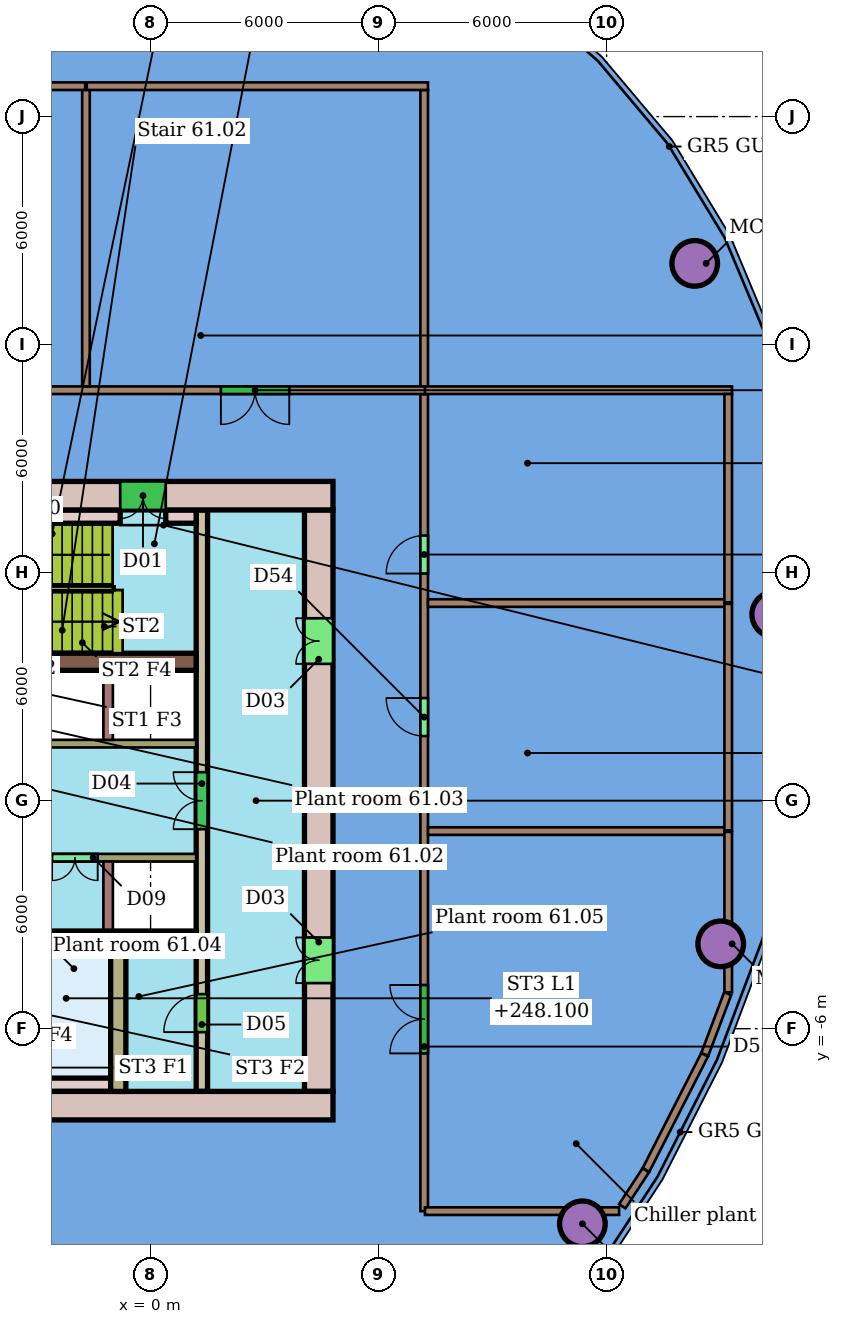
"""IFC4 building model, lengths in metres.
Left out: names, types, materials, properties, quantities, classifications, styles, units other than length and angle.
Written with IfcOpenShell. Run it as: python <this file> out.ifc"""

import sys

from ifc_helpers import new_model, si_unit, direction, frame, frame_2d, origin, origin_2d, place, context, subcontext, project, spatial, rectangle, hollow_circle, extrude, element, fill, save


model = new_model("IFC4")
c1 = context("Model", 3, precision=1e-05, world=origin(), true_north=direction((0.0, 1.0)))
c2 = subcontext(c1, "Body", "Model", "MODEL_VIEW")
j1 = project(units=[si_unit("LENGTHUNIT", "METRE"), si_unit("PLANEANGLEUNIT", "RADIAN")], contexts=[c1])
p1 = place(None, origin())
s1 = spatial("IfcSite", under=j1, at=p1, CompositionType="ELEMENT")
p2 = place(p1, origin())
s2 = spatial("IfcBuilding", under=s1, at=p2, CompositionType="ELEMENT")
p3 = place(p2, frame((0.0, 0.0, 246.1)))
s3 = spatial("IfcBuildingStorey", under=s2, at=p3, CompositionType="ELEMENT", Elevation=246.1)
for number, where, z_axis, x_axis in (
    (1, (11.363, -11.134, 0.0), (0.0, 0.0, 1.0), (1.0, 0.0, 0.0)),
    (2, (15.003, -3.768, 0.0), (0.0, 0.0, 1.0), (1.0, 0.0, 0.0)),
    (3, (16.424, 4.901, 0.0), (0.0, 0.0, 1.0), (1.0, 0.0, 0.0)),
    (4, (14.318, 14.137, 0.0), (0.0, 0.0, 1.0), (1.0, 0.0, 0.0)),
):
    element("IfcColumn", number, at=place(p3, frame(where, z_axis=z_axis, x_axis=x_axis)), inside=s3, PredefinedType="COLUMN", context=c2, shape_type="SweptSolid", body=[
        extrude(hollow_circle(Radius=0.6, WallThickness=0.045, at=origin_2d()), origin(), (0.0, 0.0, 1.0), 7.85),
    ])
p4 = place(p3, frame((7.2, -10.8, 0.0), z_axis=(0.0, 0.0, 1.0), x_axis=(0.0, 1.0, 0.0)))
e5 = element("IfcWall", 5, at=p4, inside=s3, PredefinedType="PARTITIONING", context=c2, shape_type="SweptSolid", body=[
    extrude(rectangle(XDim=21.5, YDim=0.2, at=frame_2d((10.75, 0.0))), origin(), (0.0, 0.0, 1.0), 7.5),
])
p5 = place(p4, frame((4.15, 0.0, 0.0)))
e6 = element("IfcOpeningElement", 6, at=p5, cuts=e5, PredefinedType="OPENING", context=c2, shape_type="SweptSolid", body=[
    extrude(rectangle(XDim=1.8, YDim=2.4, at=frame_2d((0.9, 1.2))), frame((0.0, 0.11, 0.0), z_axis=(0.0, -1.0, 0.0), x_axis=(1.0, 0.0, 0.0)), (0.0, 0.0, 1.0), 0.22),
])
p6 = place(p4, frame((12.5, 0.0, 0.0)))
e7 = element("IfcOpeningElement", 7, at=p6, cuts=e5, PredefinedType="OPENING", context=c2, shape_type="SweptSolid", body=[
    extrude(rectangle(XDim=1.0, YDim=2.1, at=frame_2d((0.5, 1.05))), frame((0.0, 0.11, 0.0), z_axis=(0.0, -1.0, 0.0), x_axis=(1.0, 0.0, 0.0)), (0.0, 0.0, 1.0), 0.22),
])
p7 = place(p4, frame((16.776, 0.0, 0.0)))
e8 = element("IfcOpeningElement", 8, at=p7, cuts=e5, PredefinedType="OPENING", context=c2, shape_type="SweptSolid", body=[
    extrude(rectangle(XDim=1.0, YDim=2.1, at=frame_2d((0.5, 1.05))), frame((0.0, 0.11, 0.0), z_axis=(0.0, -1.0, 0.0), x_axis=(1.0, 0.0, 0.0)), (0.0, 0.0, 1.0), 0.22),
])
p8 = place(p3, frame((7.2, 10.82, 0.0), z_axis=(0.0, 0.0, 1.0), x_axis=(0.0, 1.0, 0.0)))
e9 = element("IfcWall", 9, at=p8, inside=s3, PredefinedType="PARTITIONING", context=c2, shape_type="SweptSolid", body=[
    extrude(rectangle(XDim=7.88, YDim=0.2, at=frame_2d((3.94, 0.0))), origin(), (0.0, 0.0, 1.0), 7.5),
])
p9 = place(p3, frame((7.3, 10.8, 0.0), z_axis=(0.0, 0.0, 1.0), x_axis=(-1.0, 0.0, 0.0)))
e10 = element("IfcWall", 10, at=p9, inside=s3, PredefinedType="PARTITIONING", context=c2, shape_type="SweptSolid", body=[
    extrude(rectangle(XDim=26.6, YDim=0.2, at=frame_2d((13.3, 0.0))), origin(), (0.0, 0.0, 1.0), 7.5),
])
p10 = place(p9, frame((23.414, 0.0, 0.0)))
e11 = element("IfcOpeningElement", 11, at=p10, cuts=e10, PredefinedType="OPENING", context=c2, shape_type="SweptSolid", body=[
    extrude(rectangle(XDim=1.8, YDim=2.4, at=frame_2d((0.9, 1.2))), frame((0.0, 0.11, 0.0), z_axis=(0.0, -1.0, 0.0), x_axis=(1.0, 0.0, 0.0)), (0.0, 0.0, 1.0), 0.22),
])
p11 = place(p9, frame((12.35, 0.0, 0.0)))
e12 = element("IfcOpeningElement", 12, at=p11, cuts=e10, PredefinedType="OPENING", context=c2, shape_type="SweptSolid", body=[
    extrude(rectangle(XDim=1.8, YDim=2.4, at=frame_2d((0.9, 1.2))), frame((0.0, 0.11, 0.0), z_axis=(0.0, -1.0, 0.0), x_axis=(1.0, 0.0, 0.0)), (0.0, 0.0, 1.0), 0.22),
])
p12 = place(p9, frame((3.65, 0.0, 0.0)))
e13 = element("IfcOpeningElement", 13, at=p12, cuts=e10, PredefinedType="OPENING", context=c2, shape_type="SweptSolid", body=[
    extrude(rectangle(XDim=1.8, YDim=2.4, at=frame_2d((0.9, 1.2))), frame((0.0, 0.11, 0.0), z_axis=(0.0, -1.0, 0.0), x_axis=(1.0, 0.0, 0.0)), (0.0, 0.0, 1.0), 0.22),
])
p13 = place(p3, frame((7.22, 10.8, 0.0), z_axis=(0.0, 0.0, 1.0), x_axis=(1.0, 0.0, 0.0)))
e14 = element("IfcWall", 14, at=p13, inside=s3, PredefinedType="PARTITIONING", context=c2, shape_type="SweptSolid", body=[
    extrude(rectangle(XDim=8.08, YDim=0.2, at=frame_2d((4.04, 0.0))), origin(), (0.0, 0.0, 1.0), 7.5),
])
for number, where, z_axis, x_axis in (
    (15, (7.3, -0.8, 0.0), (0.0, 0.0, 1.0), (1.0, 0.0, 0.0)),
    (16, (7.3, 5.2, 0.0), (0.0, 0.0, 1.0), (1.0, 0.0, 0.0)),
):
    element("IfcWall", number, at=place(p3, frame(where, z_axis=z_axis, x_axis=x_axis)), inside=s3, PredefinedType="PARTITIONING", context=c2, shape_type="SweptSolid", body=[
        extrude(rectangle(XDim=7.9, YDim=0.2, at=frame_2d((3.95, 0.0))), origin(), (0.0, 0.0, 1.0), 7.5),
    ])
p14 = place(p3, frame((-1.7, 10.9, 0.0), z_axis=(0.0, 0.0, 1.0), x_axis=(0.0, 1.0, 0.0)))
e17 = element("IfcWall", 17, at=p14, inside=s3, PredefinedType="PARTITIONING", context=c2, shape_type="SweptSolid", body=[
    extrude(rectangle(XDim=7.9, YDim=0.2, at=frame_2d((3.95, 0.0))), origin(), (0.0, 0.0, 1.0), 7.5),
])
p15 = place(p3, frame((15.2, -5.042, 0.0), z_axis=(0.0, 0.0, 1.0), x_axis=(0.0, 1.0, 0.0)))
e18 = element("IfcWall", 18, at=p15, inside=s3, PredefinedType="PARTITIONING", context=c2, shape_type="SweptSolid", body=[
    extrude(rectangle(XDim=4.222, YDim=0.2, at=frame_2d((2.111, 0.0))), origin(), (0.0, 0.0, 1.0), 7.5),
])
p16 = place(p3, frame((15.2, -0.78, 0.0), z_axis=(0.0, 0.0, 1.0), x_axis=(0.0, 1.0, 0.0)))
e19 = element("IfcWall", 19, at=p16, inside=s3, PredefinedType="PARTITIONING", context=c2, shape_type="SweptSolid", body=[
    extrude(rectangle(XDim=5.96, YDim=0.2, at=frame_2d((2.98, 0.0))), origin(), (0.0, 0.0, 1.0), 7.5),
])
p17 = place(p3, frame((15.2, 5.22, 0.0), z_axis=(0.0, 0.0, 1.0), x_axis=(0.0, 1.0, 0.0)))
e20 = element("IfcWall", 20, at=p17, inside=s3, PredefinedType="PARTITIONING", context=c2, shape_type="SweptSolid", body=[
    extrude(rectangle(XDim=5.48, YDim=0.2, at=frame_2d((2.74, 0.0))), origin(), (0.0, 0.0, 1.0), 7.5),
])
p18 = place(p3, frame((14.583, -6.677, 0.0), z_axis=(0.0, 0.0, 1.0), x_axis=(0.353439463302, 0.935457399233, 0.0)))
e21 = element("IfcWall", 21, at=p18, inside=s3, PredefinedType="PARTITIONING", context=c2, shape_type="SweptSolid", body=[
    extrude(rectangle(XDim=1.709, YDim=0.2, at=frame_2d((0.854, 0.0))), origin(), (0.0, 0.0, 1.0), 7.5),
])
p19 = place(p3, frame((13.036, -9.718, 0.0), z_axis=(0.0, 0.0, 1.0), x_axis=(0.453691333143, 0.89115889393, 0.0)))
e22 = element("IfcWall", 22, at=p19, inside=s3, PredefinedType="PARTITIONING", context=c2, shape_type="SweptSolid", body=[
    extrude(rectangle(XDim=3.401, YDim=0.2, at=frame_2d((1.7, 0.0))), origin(), (0.0, 0.0, 1.0), 7.5),
])
p20 = place(p3, frame((12.412, -10.672, 0.0), z_axis=(0.0, 0.0, 1.0), x_axis=(0.546993030609, 0.837137159888, 0.0)))
e23 = element("IfcWall", 23, at=p20, inside=s3, PredefinedType="PARTITIONING", context=c2, shape_type="SweptSolid", body=[
    extrude(rectangle(XDim=1.129, YDim=0.2, at=frame_2d((0.564, 0.0))), origin(), (0.0, 0.0, 1.0), 7.5),
])
p21 = place(p3, frame((7.22, -10.8, 0.0), z_axis=(0.0, 0.0, 1.0), x_axis=(1.0, 0.0, 0.0)))
e24 = element("IfcWall", 24, at=p21, inside=s3, PredefinedType="PARTITIONING", context=c2, shape_type="SweptSolid", body=[
    extrude(rectangle(XDim=5.108, YDim=0.2, at=frame_2d((2.554, 0.0))), origin(), (0.0, 0.0, 1.0), 7.5),
])
p22 = place(p3, frame((-10.18, 18.8, 0.0), z_axis=(0.0, 0.0, 1.0), x_axis=(1.0, 0.0, 0.0)))
e25 = element("IfcWall", 25, at=p22, inside=s3, PredefinedType="PARTITIONING", context=c2, shape_type="SweptSolid", body=[
    extrude(rectangle(XDim=8.46, YDim=0.2, at=frame_2d((4.23, 0.0))), origin(), (0.0, 0.0, 1.0), 7.5),
])
p23 = place(p3, frame((-1.68, 18.8, 0.0), z_axis=(0.0, 0.0, 1.0), x_axis=(1.0, 0.0, 0.0)))
e26 = element("IfcWall", 26, at=p23, inside=s3, PredefinedType="PARTITIONING", context=c2, shape_type="SweptSolid", body=[
    extrude(rectangle(XDim=8.98, YDim=0.2, at=frame_2d((4.49, 0.0))), origin(), (0.0, 0.0, 1.0), 7.5),
])
p24 = place(p3, frame((4.8, 8.025, 0.0), z_axis=(0.0, 0.0, 1.0), x_axis=(-1.0, 0.0, 0.0)))
e27 = element("IfcWall", 27, at=p24, inside=s3, PredefinedType="SHEAR", context=c2, shape_type="SweptSolid", body=[
    extrude(rectangle(XDim=10.8, YDim=0.75, at=frame_2d((5.4, 0.0))), origin(), (0.0, 0.0, 1.0), 7.55),
])
p25 = place(p24, frame((4.4, 0.0, 0.0)))
e28 = element("IfcOpeningElement", 28, at=p25, cuts=e27, PredefinedType="OPENING", context=c2, shape_type="SweptSolid", body=[
    extrude(rectangle(XDim=1.2, YDim=2.1, at=frame_2d((0.6, 1.05))), frame((0.0, 0.385, 0.0), z_axis=(0.0, -1.0, 0.0), x_axis=(1.0, 0.0, 0.0)), (0.0, 0.0, 1.0), 0.77),
])
p26 = place(p3, frame((-16.8, -8.025, 0.0), z_axis=(0.0, 0.0, 1.0), x_axis=(1.0, 0.0, 0.0)))
e29 = element("IfcWall", 29, at=p26, inside=s3, PredefinedType="SHEAR", context=c2, shape_type="SweptSolid", body=[
    extrude(rectangle(XDim=21.6, YDim=0.75, at=frame_2d((10.8, 0.0))), origin(), (0.0, 0.0, 1.0), 7.55),
])
p27 = place(p26, frame((4.8, 0.0, 0.0)))
e30 = element("IfcOpeningElement", 30, at=p27, cuts=e29, PredefinedType="OPENING", context=c2, shape_type="SweptSolid", body=[
    extrude(rectangle(XDim=1.2, YDim=2.1, at=frame_2d((0.6, 1.05))), frame((0.0, 0.385, 0.0), z_axis=(0.0, -1.0, 0.0), x_axis=(1.0, 0.0, 0.0)), (0.0, 0.0, 1.0), 0.77),
])
p28 = place(p3, frame((4.425, -7.65, 0.0), z_axis=(0.0, 0.0, 1.0), x_axis=(0.0, 1.0, 0.0)))
e31 = element("IfcWall", 31, at=p28, inside=s3, PredefinedType="SHEAR", context=c2, shape_type="SweptSolid", body=[
    extrude(rectangle(XDim=15.3, YDim=0.75, at=frame_2d((7.65, 0.0))), origin(), (0.0, 0.0, 1.0), 7.55),
])
p29 = place(p28, frame((2.85, 0.0, 0.0)))
e32 = element("IfcOpeningElement", 32, at=p29, cuts=e31, PredefinedType="OPENING", context=c2, shape_type="SweptSolid", body=[
    extrude(rectangle(XDim=1.2, YDim=2.1, at=frame_2d((0.6, 1.05))), frame((0.0, 0.385, 0.0), z_axis=(0.0, -1.0, 0.0), x_axis=(1.0, 0.0, 0.0)), (0.0, 0.0, 1.0), 0.77),
])
p30 = place(p28, frame((11.25, 0.0, 0.0)))
e33 = element("IfcOpeningElement", 33, at=p30, cuts=e31, PredefinedType="OPENING", context=c2, shape_type="SweptSolid", body=[
    extrude(rectangle(XDim=1.2, YDim=2.1, at=frame_2d((0.6, 1.05))), frame((0.0, 0.385, 0.0), z_axis=(0.0, -1.0, 0.0), x_axis=(1.0, 0.0, 0.0)), (0.0, 0.0, 1.0), 0.77),
])
for number, where, z_axis, x_axis in (
    (34, (-6.0, 3.655, 0.0), (0.0, 0.0, 1.0), (1.0, 0.0, 0.0)),
    (35, (-6.0, -3.655, 0.0), (0.0, 0.0, 1.0), (1.0, 0.0, 0.0)),
):
    element("IfcWall", number, at=place(p3, frame(where, z_axis=z_axis, x_axis=x_axis)), inside=s3, PredefinedType="SHEAR", context=c2, shape_type="SweptSolid", body=[
        extrude(rectangle(XDim=7.2, YDim=0.45, at=frame_2d((3.6, 0.0))), origin(), (0.0, 0.0, 1.0), 7.55),
    ])
p31 = place(p3, frame((1.35, -7.65, 0.0), z_axis=(0.0, 0.0, 1.0), x_axis=(0.0, 1.0, 0.0)))
e36 = element("IfcWall", 36, at=p31, inside=s3, PredefinedType="SHEAR", context=c2, shape_type="SweptSolid", body=[
    extrude(rectangle(XDim=15.3, YDim=0.3, at=frame_2d((7.65, 0.0))), origin(), (0.0, 0.0, 1.0), 7.55),
])
p32 = place(p31, frame((1.56, 0.0, 0.0)))
e37 = element("IfcOpeningElement", 37, at=p32, cuts=e36, PredefinedType="OPENING", context=c2, shape_type="SweptSolid", body=[
    extrude(rectangle(XDim=1.0, YDim=2.1, at=frame_2d((0.5, 1.05))), frame((0.0, 0.16, 0.0), z_axis=(0.0, -1.0, 0.0), x_axis=(1.0, 0.0, 0.0)), (0.0, 0.0, 1.0), 0.32),
])
p33 = place(p31, frame((6.9, 0.0, 0.0)))
e38 = element("IfcOpeningElement", 38, at=p33, cuts=e36, PredefinedType="OPENING", context=c2, shape_type="SweptSolid", body=[
    extrude(rectangle(XDim=1.5, YDim=2.1, at=frame_2d((0.75, 1.05))), frame((0.0, 0.16, 0.0), z_axis=(0.0, -1.0, 0.0), x_axis=(1.0, 0.0, 0.0)), (0.0, 0.0, 1.0), 0.32),
])
p34 = place(p3, frame((-13.2, 1.5, 0.0), z_axis=(0.0, 0.0, 1.0), x_axis=(1.0, 0.0, 0.0)))
e39 = element("IfcWall", 39, at=p34, inside=s3, PredefinedType="SHEAR", context=c2, shape_type="SweptSolid", body=[
    extrude(rectangle(XDim=14.4, YDim=0.2, at=frame_2d((7.2, 0.0))), origin(), (0.0, 0.0, 1.0), 7.55),
])
p35 = place(p34, frame((0.15, 0.0, 0.0)))
e40 = element("IfcOpeningElement", 40, at=p35, cuts=e39, PredefinedType="OPENING", context=c2, shape_type="SweptSolid", body=[
    extrude(rectangle(XDim=1.2, YDim=2.4, at=frame_2d((0.6, 1.2))), frame((0.0, 0.11, 0.0), z_axis=(0.0, -1.0, 0.0), x_axis=(1.0, 0.0, 0.0)), (0.0, 0.0, 1.0), 0.22),
])
p36 = place(p34, frame((2.794, 0.0, 0.0)))
e41 = element("IfcOpeningElement", 41, at=p36, cuts=e39, PredefinedType="OPENING", context=c2, shape_type="SweptSolid", body=[
    extrude(rectangle(XDim=1.2, YDim=2.4, at=frame_2d((0.6, 1.2))), frame((0.0, 0.11, 0.0), z_axis=(0.0, -1.0, 0.0), x_axis=(1.0, 0.0, 0.0)), (0.0, 0.0, 1.0), 0.22),
])
p37 = place(p34, frame((8.167, 0.0, 0.0)))
e42 = element("IfcOpeningElement", 42, at=p37, cuts=e39, PredefinedType="OPENING", context=c2, shape_type="SweptSolid", body=[
    extrude(rectangle(XDim=1.2, YDim=2.4, at=frame_2d((0.6, 1.2))), frame((0.0, 0.11, 0.0), z_axis=(0.0, -1.0, 0.0), x_axis=(1.0, 0.0, 0.0)), (0.0, 0.0, 1.0), 0.22),
])
p38 = place(p3, frame((1.2, -1.5, 0.0), z_axis=(0.0, 0.0, 1.0), x_axis=(-1.0, 0.0, 0.0)))
e43 = element("IfcWall", 43, at=p38, inside=s3, PredefinedType="SHEAR", context=c2, shape_type="SweptSolid", body=[
    extrude(rectangle(XDim=14.4, YDim=0.2, at=frame_2d((7.2, 0.0))), origin(), (0.0, 0.0, 1.0), 7.55),
])
p39 = place(p38, frame((7.821, 0.0, 0.0)))
e44 = element("IfcOpeningElement", 44, at=p39, cuts=e43, PredefinedType="OPENING", context=c2, shape_type="SweptSolid", body=[
    extrude(rectangle(XDim=1.2, YDim=2.1, at=frame_2d((0.6, 1.05))), frame((0.0, 0.11, 0.0), z_axis=(0.0, -1.0, 0.0), x_axis=(1.0, 0.0, 0.0)), (0.0, 0.0, 1.0), 0.22),
])
p40 = place(p38, frame((2.592, 0.0, 0.0)))
e45 = element("IfcOpeningElement", 45, at=p40, cuts=e43, PredefinedType="OPENING", context=c2, shape_type="SweptSolid", body=[
    extrude(rectangle(XDim=1.2, YDim=2.4, at=frame_2d((0.6, 1.2))), frame((0.0, 0.11, 0.0), z_axis=(0.0, -1.0, 0.0), x_axis=(1.0, 0.0, 0.0)), (0.0, 0.0, 1.0), 0.22),
])
p41 = place(p3, frame((-0.85, -3.88, 0.0), z_axis=(0.0, 0.0, 1.0), x_axis=(0.0, -1.0, 0.0)))
e46 = element("IfcWall", 46, at=p41, inside=s3, PredefinedType="SHEAR", context=c2, shape_type="SweptSolid", body=[
    extrude(rectangle(XDim=3.77, YDim=0.4, at=frame_2d((1.885, 0.0))), origin(), (0.0, 0.0, 1.0), 7.55),
])
p42 = place(p3, frame((-5.85, 7.475, 0.0), z_axis=(0.0, 0.0, 1.0), x_axis=(1.0, 0.0, 0.0)))
e47 = element("IfcWall", 47, at=p42, inside=s3, PredefinedType="SHEAR", context=c2, shape_type="SweptSolid", body=[
    extrude(rectangle(XDim=5.05, YDim=0.35, at=frame_2d((2.525, 0.0))), origin(), (0.0, 0.0, 1.0), 7.55),
])
p43 = place(p3, frame((0.4, 7.475, 0.0), z_axis=(0.0, 0.0, 1.0), x_axis=(1.0, 0.0, 0.0)))
e48 = element("IfcWall", 48, at=p43, inside=s3, PredefinedType="SHEAR", context=c2, shape_type="SweptSolid", body=[
    extrude(rectangle(XDim=0.8, YDim=0.35, at=frame_2d((0.4, 0.0))), origin(), (0.0, 0.0, 1.0), 7.55),
])
p44 = place(p3, frame((-8.1, -7.475, 0.0), z_axis=(0.0, 0.0, 1.0), x_axis=(1.0, 0.0, 0.0)))
e49 = element("IfcWall", 49, at=p44, inside=s3, PredefinedType="SHEAR", context=c2, shape_type="SweptSolid", body=[
    extrude(rectangle(XDim=7.05, YDim=0.35, at=frame_2d((3.525, 0.0))), origin(), (0.0, 0.0, 1.0), 7.55),
])
for number, where, z_axis, x_axis in (
    (50, (-1.117, 1.6, 0.0), (0.0, 0.0, 1.0), (0.0, 1.0, 0.0)),
    (51, (-1.117, -1.6, 0.0), (0.0, 0.0, 1.0), (0.0, -1.0, 0.0)),
):
    element("IfcWall", number, at=place(p3, frame(where, z_axis=z_axis, x_axis=x_axis)), inside=s3, PredefinedType="SHEAR", context=c2, shape_type="SweptSolid", body=[
        extrude(rectangle(XDim=1.83, YDim=0.25, at=frame_2d((0.915, 0.0))), origin(), (0.0, 0.0, 1.0), 7.55),
    ])
p45 = place(p5, origin())
e52 = element("IfcDoor", 52, at=p45, inside=s3, OperationType="DOUBLE_DOOR_SINGLE_SWING", PredefinedType="DOOR", context=c2, shape_type="SweptSolid", body=[
    extrude(rectangle(XDim=1.8, YDim=2.4, at=frame_2d((0.9, 1.2))), frame((0.0, 0.025, 0.0), z_axis=(0.0, -1.0, 0.0), x_axis=(1.0, 0.0, 0.0)), (0.0, 0.0, 1.0), 0.05),
])
fill(e6, e52)
p46 = place(p6, origin())
e53 = element("IfcDoor", 53, at=p46, inside=s3, OperationType="SINGLE_SWING_RIGHT", PredefinedType="DOOR", context=c2, shape_type="SweptSolid", body=[
    extrude(rectangle(XDim=1.0, YDim=2.1, at=frame_2d((0.5, 1.05))), frame((0.0, 0.025, 0.0), z_axis=(0.0, -1.0, 0.0), x_axis=(1.0, 0.0, 0.0)), (0.0, 0.0, 1.0), 0.05),
])
fill(e7, e53)
p47 = place(p7, origin())
e54 = element("IfcDoor", 54, at=p47, inside=s3, OperationType="SINGLE_SWING_LEFT", PredefinedType="DOOR", context=c2, shape_type="SweptSolid", body=[
    extrude(rectangle(XDim=1.0, YDim=2.1, at=frame_2d((0.5, 1.05))), frame((0.0, 0.025, 0.0), z_axis=(0.0, -1.0, 0.0), x_axis=(1.0, 0.0, 0.0)), (0.0, 0.0, 1.0), 0.05),
])
fill(e8, e54)
p48 = place(p12, origin())
e55 = element("IfcDoor", 55, at=p48, inside=s3, OperationType="DOUBLE_DOOR_SINGLE_SWING", PredefinedType="DOOR", context=c2, shape_type="SweptSolid", body=[
    extrude(rectangle(XDim=1.8, YDim=2.4, at=frame_2d((0.9, 1.2))), frame((0.0, 0.025, 0.0), z_axis=(0.0, -1.0, 0.0), x_axis=(1.0, 0.0, 0.0)), (0.0, 0.0, 1.0), 0.05),
])
fill(e13, e55)
p49 = place(p25, origin())
e56 = element("IfcDoor", 56, at=p49, inside=s3, OperationType="DOUBLE_DOOR_SINGLE_SWING", PredefinedType="NOTDEFINED", context=c2, shape_type="SweptSolid", body=[
    extrude(rectangle(XDim=1.2, YDim=2.1, at=frame_2d((0.6, 1.05))), frame((0.0, 0.025, 0.0), z_axis=(0.0, -1.0, 0.0), x_axis=(1.0, 0.0, 0.0)), (0.0, 0.0, 1.0), 0.05),
])
fill(e28, e56)
p50 = place(p29, origin())
e57 = element("IfcDoor", 57, at=p50, inside=s3, OperationType="DOUBLE_DOOR_SINGLE_SWING", PredefinedType="NOTDEFINED", context=c2, shape_type="SweptSolid", body=[
    extrude(rectangle(XDim=1.2, YDim=2.1, at=frame_2d((0.6, 1.05))), frame((0.0, 0.025, 0.0), z_axis=(0.0, -1.0, 0.0), x_axis=(1.0, 0.0, 0.0)), (0.0, 0.0, 1.0), 0.05),
])
fill(e32, e57)
p51 = place(p30, origin())
e58 = element("IfcDoor", 58, at=p51, inside=s3, OperationType="DOUBLE_DOOR_SINGLE_SWING", PredefinedType="NOTDEFINED", context=c2, shape_type="SweptSolid", body=[
    extrude(rectangle(XDim=1.2, YDim=2.1, at=frame_2d((0.6, 1.05))), frame((0.0, 0.025, 0.0), z_axis=(0.0, -1.0, 0.0), x_axis=(1.0, 0.0, 0.0)), (0.0, 0.0, 1.0), 0.05),
])
fill(e33, e58)
p52 = place(p32, origin())
e59 = element("IfcDoor", 59, at=p52, inside=s3, OperationType="SINGLE_SWING_LEFT", PredefinedType="NOTDEFINED", context=c2, shape_type="SweptSolid", body=[
    extrude(rectangle(XDim=1.0, YDim=2.1, at=frame_2d((0.5, 1.05))), frame((0.0, 0.025, 0.0), z_axis=(0.0, -1.0, 0.0), x_axis=(1.0, 0.0, 0.0)), (0.0, 0.0, 1.0), 0.05),
])
fill(e37, e59)
p53 = place(p33, origin())
e60 = element("IfcDoor", 60, at=p53, inside=s3, OperationType="DOUBLE_DOOR_SINGLE_SWING", PredefinedType="NOTDEFINED", context=c2, shape_type="SweptSolid", body=[
    extrude(rectangle(XDim=1.5, YDim=2.1, at=frame_2d((0.75, 1.05))), frame((0.0, 0.025, 0.0), z_axis=(0.0, -1.0, 0.0), x_axis=(1.0, 0.0, 0.0)), (0.0, 0.0, 1.0), 0.05),
])
fill(e38, e60)
p54 = place(p40, origin())
e61 = element("IfcDoor", 61, at=p54, inside=s3, OperationType="DOUBLE_DOOR_SINGLE_SWING", PredefinedType="NOTDEFINED", context=c2, shape_type="SweptSolid", body=[
    extrude(rectangle(XDim=1.2, YDim=2.4, at=frame_2d((0.6, 1.2))), frame((0.0, 0.025, 0.0), z_axis=(0.0, -1.0, 0.0), x_axis=(1.0, 0.0, 0.0)), (0.0, 0.0, 1.0), 0.05),
])
fill(e45, e61)
save(model, sys.argv[1])
